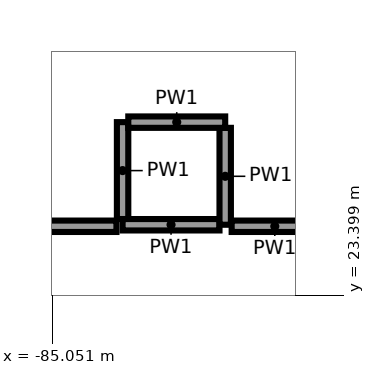
"""IFC4 building model, lengths in metres.
Left out: names, types, materials, properties, quantities, classifications, styles, units other than length and angle.
Written with IfcOpenShell. Run it as: python <this file> out.ifc"""

import sys

from ifc_helpers import new_model, si_unit, direction, frame, frame_2d, origin, place, context, subcontext, project, spatial, rectangle, extrude, element, save


model = new_model("IFC4")
c1 = context("Model", 3, precision=1e-05, world=origin(), true_north=direction((0.0, 1.0)))
c2 = subcontext(c1, "Body", "Model", "MODEL_VIEW")
j1 = project(units=[si_unit("LENGTHUNIT", "METRE"), si_unit("PLANEANGLEUNIT", "RADIAN")], contexts=[c1])
p1 = place(None, origin())
s1 = spatial("IfcSite", under=j1, at=p1, CompositionType="ELEMENT")
p2 = place(p1, origin())
s2 = spatial("IfcBuilding", under=s1, at=p2, CompositionType="ELEMENT")
p3 = place(p2, frame((0.0, 0.0, 12.0)))
s3 = spatial("IfcBuildingStorey", under=s2, at=p3, CompositionType="ELEMENT", Elevation=12.0)
p4 = place(p3, frame((-84.125, 25.675, 0.0), z_axis=(0.0, 0.0, 1.0), x_axis=(0.0, -1.0, 0.0)))
e1 = element("IfcWall", 1, at=p4, inside=s3, PredefinedType="PARTITIONING", context=c2, shape_type="SweptSolid", body=[
    extrude(rectangle(XDim=1.275, YDim=0.15, at=frame_2d((0.638, 0.0))), origin(), (0.0, 0.0, 1.0), 5.65),
])
p5 = place(p3, frame((-84.125, 24.325, 0.0), z_axis=(0.0, 0.0, 1.0), x_axis=(1.0, 0.0, 0.0)))
e2 = element("IfcWall", 2, at=p5, inside=s3, PredefinedType="PARTITIONING", context=c2, shape_type="SweptSolid", body=[
    extrude(rectangle(XDim=1.275, YDim=0.15, at=frame_2d((0.637, 0.0))), origin(), (0.0, 0.0, 1.0), 5.65),
])
for number, where, z_axis, x_axis in (
    (3, (-82.775, 24.325, 0.0), (0.0, 0.0, 1.0), (0.0, 1.0, 0.0)),
    (4, (-82.775, 25.675, 0.0), (0.0, 0.0, 1.0), (-1.0, 0.0, 0.0)),
):
    element("IfcWall", number, at=place(p3, frame(where, z_axis=z_axis, x_axis=x_axis)), inside=s3, PredefinedType="PARTITIONING", context=c2, shape_type="SweptSolid", body=[
        extrude(rectangle(XDim=1.275, YDim=0.15, at=frame_2d((0.638, 0.0))), origin(), (0.0, 0.0, 1.0), 5.65),
    ])
p6 = place(p3, frame((-87.909, 24.305, 0.0), z_axis=(0.0, 0.0, 1.0), x_axis=(1.0, 0.0, 0.0)))
e5 = element("IfcWall", 5, at=p6, inside=s3, PredefinedType="PARTITIONING", context=c2, shape_type="SweptSolid", body=[
    extrude(rectangle(XDim=3.704, YDim=0.15, at=frame_2d((1.852, 0.0))), origin(), (0.0, 0.0, 1.0), 4.55),
])
p7 = place(p6, frame((0.65, 0.0, 0.0)))
e6 = element("IfcOpeningElement", 6, at=p7, cuts=e5, PredefinedType="OPENING", context=c2, shape_type="SweptSolid", body=[
    extrude(rectangle(XDim=1.8, YDim=2.1, at=frame_2d((0.9, 1.05))), frame((0.0, 0.085, 0.0), z_axis=(0.0, -1.0, 0.0), x_axis=(1.0, 0.0, 0.0)), (0.0, 0.0, 1.0), 0.17),
])
p8 = place(p3, frame((-82.69, 24.305, 0.0), z_axis=(0.0, 0.0, 1.0), x_axis=(1.0, 0.0, 0.0)))
e7 = element("IfcWall", 7, at=p8, inside=s3, PredefinedType="PARTITIONING", context=c2, shape_type="SweptSolid", body=[
    extrude(rectangle(XDim=1.135, YDim=0.15, at=frame_2d((0.567, 0.0))), origin(), (0.0, 0.0, 1.0), 5.65),
])
save(model, sys.argv[1])
